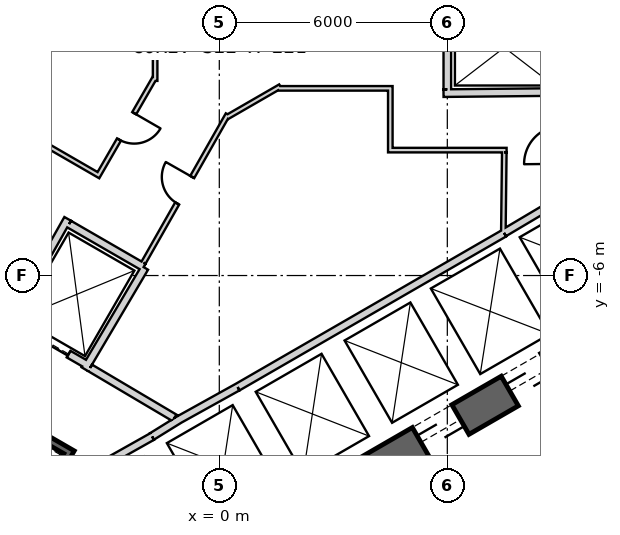
"""IFC4 building model, lengths in metres.
Left out: names, types, materials, properties, quantities, classifications, styles, units other than length and angle.
Written with IfcOpenShell. Run it as: python <this file> out.ifc"""

import sys

from ifc_helpers import new_model, si_unit, direction, frame, frame_2d, origin, place, context, subcontext, project, spatial, rectangle, extrude, element, fill, save


model = new_model("IFC4")
c1 = context("Model", 3, precision=1e-05, world=origin(), true_north=direction((0.0, 1.0)))
c2 = subcontext(c1, "Body", "Model", "MODEL_VIEW")
j1 = project(units=[si_unit("LENGTHUNIT", "METRE"), si_unit("PLANEANGLEUNIT", "RADIAN")], contexts=[c1])
p1 = place(None, origin())
s1 = spatial("IfcSite", under=j1, at=p1, CompositionType="ELEMENT")
p2 = place(p1, origin())
s2 = spatial("IfcBuilding", under=s1, at=p2, CompositionType="ELEMENT")
p3 = place(p2, frame((0.0, 0.0, 169.2)))
s3 = spatial("IfcBuildingStorey", under=s2, at=p3, CompositionType="ELEMENT", Elevation=169.2)
p4 = place(p3, frame((-7.825, -17.97, 0.0), z_axis=(0.0, 0.0, 1.0), x_axis=(0.866028369851, 0.499994862586, 0.0)))
e1 = element("IfcWall", 1, at=p4, inside=s3, PredefinedType="SHEAR", context=c2, shape_type="SweptSolid", body=[
    extrude(rectangle(XDim=31.523, YDim=0.9, at=frame_2d((15.762, 0.0))), origin(), (0.0, 0.0, 1.0), 4.0),
])
p5 = place(p4, frame((7.062, 0.0, 0.0)))
e2 = element("IfcOpeningElement", 2, at=p5, cuts=e1, PredefinedType="OPENING", context=c2, shape_type="SweptSolid", body=[
    extrude(rectangle(XDim=1.2, YDim=2.4, at=frame_2d((0.6, 1.2))), frame((0.0, 0.46, 0.0), z_axis=(0.0, -1.0, 0.0), x_axis=(1.0, 0.0, 0.0)), (0.0, 0.0, 1.0), 0.92),
])
p6 = place(p4, frame((9.762, 0.0, 0.0)))
e3 = element("IfcOpeningElement", 3, at=p6, cuts=e1, PredefinedType="OPENING", context=c2, shape_type="SweptSolid", body=[
    extrude(rectangle(XDim=1.2, YDim=2.4, at=frame_2d((0.6, 1.2))), frame((0.0, 0.46, 0.0), z_axis=(0.0, -1.0, 0.0), x_axis=(1.0, 0.0, 0.0)), (0.0, 0.0, 1.0), 0.92),
])
p7 = place(p4, frame((12.462, 0.0, 0.0)))
e4 = element("IfcOpeningElement", 4, at=p7, cuts=e1, PredefinedType="OPENING", context=c2, shape_type="SweptSolid", body=[
    extrude(rectangle(XDim=1.2, YDim=2.4, at=frame_2d((0.6, 1.2))), frame((0.0, 0.46, 0.0), z_axis=(0.0, -1.0, 0.0), x_axis=(1.0, 0.0, 0.0)), (0.0, 0.0, 1.0), 0.92),
])
p8 = place(p4, frame((15.162, 0.0, 0.0)))
e5 = element("IfcOpeningElement", 5, at=p8, cuts=e1, PredefinedType="OPENING", context=c2, shape_type="SweptSolid", body=[
    extrude(rectangle(XDim=1.2, YDim=2.4, at=frame_2d((0.6, 1.2))), frame((0.0, 0.46, 0.0), z_axis=(0.0, -1.0, 0.0), x_axis=(1.0, 0.0, 0.0)), (0.0, 0.0, 1.0), 0.92),
])
p9 = place(p4, frame((17.862, 0.0, 0.0)))
e6 = element("IfcOpeningElement", 6, at=p9, cuts=e1, PredefinedType="OPENING", context=c2, shape_type="SweptSolid", body=[
    extrude(rectangle(XDim=1.2, YDim=2.4, at=frame_2d((0.6, 1.2))), frame((0.0, 0.46, 0.0), z_axis=(0.0, -1.0, 0.0), x_axis=(1.0, 0.0, 0.0)), (0.0, 0.0, 1.0), 0.92),
])
p10 = place(p4, frame((20.562, 0.0, 0.0)))
e7 = element("IfcOpeningElement", 7, at=p10, cuts=e1, PredefinedType="OPENING", context=c2, shape_type="SweptSolid", body=[
    extrude(rectangle(XDim=1.2, YDim=2.4, at=frame_2d((0.6, 1.2))), frame((0.0, 0.46, 0.0), z_axis=(0.0, -1.0, 0.0), x_axis=(1.0, 0.0, 0.0)), (0.0, 0.0, 1.0), 0.92),
])
p11 = place(p4, frame((26.712, 0.0, 0.0)))
e8 = element("IfcOpeningElement", 8, at=p11, cuts=e1, PredefinedType="OPENING", context=c2, shape_type="SweptSolid", body=[
    extrude(rectangle(XDim=1.2, YDim=2.4, at=frame_2d((0.6, 1.2))), frame((0.0, 0.46, 0.0), z_axis=(0.0, -1.0, 0.0), x_axis=(1.0, 0.0, 0.0)), (0.0, 0.0, 1.0), 0.92),
])
p12 = place(p4, frame((3.612, 0.0, 0.0)))
e9 = element("IfcOpeningElement", 9, at=p12, cuts=e1, PredefinedType="OPENING", context=c2, shape_type="SweptSolid", body=[
    extrude(rectangle(XDim=1.2, YDim=2.4, at=frame_2d((0.6, 1.2))), frame((0.0, 0.46, 0.0), z_axis=(0.0, -1.0, 0.0), x_axis=(1.0, 0.0, 0.0)), (0.0, 0.0, 1.0), 0.92),
])
p13 = place(p3, frame((0.483, -8.936, 0.0), z_axis=(0.0, 0.0, 1.0), x_axis=(0.866030989016, 0.499990325971, 0.0)))
e10 = element("IfcWall", 10, at=p13, inside=s3, PredefinedType="PLUMBINGWALL", context=c2, shape_type="SweptSolid", body=[
    extrude(rectangle(XDim=8.1, YDim=0.2, at=frame_2d((4.05, 0.0))), origin(), (0.0, 0.0, 1.0), 3.7),
])
p14 = place(p3, frame((7.493, -4.878, 0.0), z_axis=(0.0, 0.0, 1.0), x_axis=(0.859981807212, 0.510324691999, 0.0)))
e11 = element("IfcWall", 11, at=p14, inside=s3, PredefinedType="PLUMBINGWALL", context=c2, shape_type="SweptSolid", body=[
    extrude(rectangle(XDim=1.845, YDim=0.2, at=frame_2d((0.922, 0.0))), origin(), (0.0, 0.0, 1.0), 3.7),
])
p15 = place(p3, frame((-1.769, -10.237, 0.0), z_axis=(0.0, 0.0, 1.0), x_axis=(-0.871534483978, -0.490334215854, 0.0)))
e12 = element("IfcWall", 12, at=p15, inside=s3, PredefinedType="PLUMBINGWALL", context=c2, shape_type="SweptSolid", body=[
    extrude(rectangle(XDim=2.7, YDim=0.2, at=frame_2d((1.35, 0.0))), origin(), (0.0, 0.0, 1.0), 3.7),
])
p16 = place(p3, frame((-1.024, -9.771, 0.0), z_axis=(0.0, 0.0, 1.0), x_axis=(-0.850348075135, -0.526220629693, 0.0)))
e13 = element("IfcWall", 13, at=p16, inside=s3, PredefinedType="PLUMBINGWALL", context=c2, shape_type="SweptSolid", body=[
    extrude(rectangle(XDim=0.878, YDim=0.2, at=frame_2d((0.439, 0.0))), origin(), (0.0, 0.0, 1.0), 3.7),
])
p17 = place(p3, frame((-1.13, -9.831, 0.0), z_axis=(0.0, 0.0, 1.0), x_axis=(0.874269620932, 0.485440655401, 0.0)))
e14 = element("IfcWall", 14, at=p17, inside=s3, PredefinedType="PLUMBINGWALL", context=c2, shape_type="SweptSolid", body=[
    extrude(rectangle(XDim=1.845, YDim=0.2, at=frame_2d((0.922, 0.0))), origin(), (0.0, 0.0, 1.0), 3.7),
])
p18 = place(p3, frame((5.9, -1.201, 0.0), z_axis=(0.0, 0.0, 1.0), x_axis=(0.999950064753, 0.009993397809, 0.0)))
e15 = element("IfcWall", 15, at=p18, inside=s3, PredefinedType="PLUMBINGWALL", context=c2, shape_type="SweptSolid", body=[
    extrude(rectangle(XDim=3.2, YDim=0.2, at=frame_2d((1.6, 0.0))), origin(), (0.0, 0.0, 1.0), 3.7),
])
p19 = place(p3, frame((6.0, -1.1, 0.0), z_axis=(0.0, 0.0, 1.0), x_axis=(0.0, 1.0, 0.0)))
e16 = element("IfcWall", 16, at=p19, inside=s3, PredefinedType="PLUMBINGWALL", context=c2, shape_type="SweptSolid", body=[
    extrude(rectangle(XDim=2.28, YDim=0.2, at=frame_2d((1.14, 0.0))), origin(), (0.0, 0.0, 1.0), 3.7),
])
p20 = place(p3, frame((-3.905, -10.563, -0.3), z_axis=(0.0, 0.0, 1.0), x_axis=(-0.500012932018, -0.866017937352, 0.0)))
e17 = element("IfcWall", 17, at=p20, inside=s3, PredefinedType="SHEAR", context=c2, shape_type="SweptSolid", body=[
    extrude(rectangle(XDim=8.1, YDim=0.2, at=frame_2d((4.05, 0.0))), origin(), (0.0, 0.0, 1.0), 4.0),
])
p21 = place(p3, frame((-4.041, -10.599, -0.3), z_axis=(0.0, 0.0, 1.0), x_axis=(-0.866047807691, 0.499961193289, 0.0)))
e18 = element("IfcWall", 18, at=p21, inside=s3, PredefinedType="SHEAR", context=c2, shape_type="SweptSolid", body=[
    extrude(rectangle(XDim=3.6, YDim=0.2, at=frame_2d((1.8, 0.0))), origin(), (0.0, 0.0, 1.0), 4.0),
])
p22 = place(p21, frame((1.25, 0.0, 0.3)))
e19 = element("IfcOpeningElement", 19, at=p22, cuts=e18, PredefinedType="OPENING", context=c2, shape_type="SweptSolid", body=[
    extrude(rectangle(XDim=1.1, YDim=2.1, at=frame_2d((0.55, 1.05))), frame((0.0, 0.11, 0.0), z_axis=(0.0, -1.0, 0.0), x_axis=(1.0, 0.0, 0.0)), (0.0, 0.0, 1.0), 0.22),
])
p23 = place(p3, frame((-3.446, -8.368, 0.0), z_axis=(0.0, 0.0, 1.0), x_axis=(-0.866024647952, 0.500001309137, 0.0)))
e20 = element("IfcWall", 20, at=p23, inside=s3, PredefinedType="PLUMBINGWALL", context=c2, shape_type="SweptSolid", body=[
    extrude(rectangle(XDim=2.4, YDim=0.2, at=frame_2d((1.2, 0.0))), origin(), (0.0, 0.0, 1.0), 3.7),
])
p24 = place(p23, frame((0.6, 0.0, 0.0)))
e21 = element("IfcOpeningElement", 21, at=p24, cuts=e20, PredefinedType="OPENING", context=c2, shape_type="SweptSolid", body=[
    extrude(rectangle(XDim=1.2, YDim=2.4, at=frame_2d((0.6, 1.2))), frame((0.0, 0.11, 0.0), z_axis=(0.0, -1.0, 0.0), x_axis=(1.0, 0.0, 0.0)), (0.0, 0.0, 1.0), 0.22),
])
p25 = place(p3, frame((-1.961, -5.796, 0.0), z_axis=(0.0, 0.0, 1.0), x_axis=(-0.508647062354, -0.860975125052, 0.0)))
e22 = element("IfcWall", 22, at=p25, inside=s3, PredefinedType="PLUMBINGWALL", context=c2, shape_type="SweptSolid", body=[
    extrude(rectangle(XDim=3.1, YDim=0.2, at=frame_2d((1.55, 0.0))), origin(), (0.0, 0.0, 1.0), 3.7),
])
p26 = place(p3, frame((-3.99, -4.509, 0.0), z_axis=(0.0, 0.0, 1.0), x_axis=(-0.491358283181, -0.870957540612, 0.0)))
e23 = element("IfcWall", 23, at=p26, inside=s3, PredefinedType="PLUMBINGWALL", context=c2, shape_type="SweptSolid", body=[
    extrude(rectangle(XDim=3.2, YDim=0.2, at=frame_2d((1.6, 0.0))), origin(), (0.0, 0.0, 1.0), 3.7),
])
p27 = place(p3, frame((-3.953, -4.646, 0.0), z_axis=(0.0, 0.0, 1.0), x_axis=(0.866065302921, -0.4999308863, 0.0)))
e24 = element("IfcWall", 24, at=p27, inside=s3, PredefinedType="PLUMBINGWALL", context=c2, shape_type="SweptSolid", body=[
    extrude(rectangle(XDim=2.264, YDim=0.2, at=frame_2d((1.132, 0.0))), origin(), (0.0, 0.0, 1.0), 3.7),
])
p28 = place(p3, frame((-3.401, -8.43, 0.0), z_axis=(0.0, 0.0, 1.0), x_axis=(0.860615607571, -0.509255118781, 0.0)))
e25 = element("IfcWall", 25, at=p28, inside=s3, PredefinedType="PARTITIONING", context=c2, shape_type="SweptSolid", body=[
    extrude(rectangle(XDim=2.581, YDim=0.2, at=frame_2d((1.29, 0.0))), origin(), (0.0, 0.0, 1.0), 3.7),
])
p29 = place(p3, frame((0.224, -1.761, 0.0), z_axis=(0.0, 0.0, 1.0), x_axis=(-0.494327216836, -0.869275907118, 0.0)))
e26 = element("IfcWall", 26, at=p29, inside=s3, PredefinedType="PARTITIONING", context=c2, shape_type="SweptSolid", body=[
    extrude(rectangle(XDim=4.487, YDim=0.12, at=frame_2d((2.244, 0.0))), origin(), (0.0, 0.0, 1.0), 3.7),
])
p30 = place(p29, frame((1.895, 0.0, 0.0)))
e27 = element("IfcOpeningElement", 27, at=p30, cuts=e26, PredefinedType="OPENING", context=c2, shape_type="SweptSolid", body=[
    extrude(rectangle(XDim=0.8, YDim=2.1, at=frame_2d((0.4, 1.05))), frame((0.0, 0.07, 0.0), z_axis=(0.0, -1.0, 0.0), x_axis=(1.0, 0.0, 0.0)), (0.0, 0.0, 1.0), 0.14),
])
p31 = place(p3, frame((1.605, -1.023, 0.0), z_axis=(0.0, 0.0, 1.0), x_axis=(-0.866001581989, -0.50004125829, 0.0)))
e28 = element("IfcWall", 28, at=p31, inside=s3, PredefinedType="PARTITIONING", context=c2, shape_type="SweptSolid", body=[
    extrude(rectangle(XDim=1.635, YDim=0.12, at=frame_2d((0.817, 0.0))), origin(), (0.0, 0.0, 1.0), 3.7),
])
p32 = place(p3, frame((4.56, -1.075, 0.0), z_axis=(0.0, 0.0, 1.0), x_axis=(-1.0, 0.0, 0.0)))
e29 = element("IfcWall", 29, at=p32, inside=s3, PredefinedType="PARTITIONING", context=c2, shape_type="SweptSolid", body=[
    extrude(rectangle(XDim=3.026, YDim=0.12, at=frame_2d((1.513, 0.0))), origin(), (0.0, 0.0, 1.0), 3.7),
])
p33 = place(p3, frame((4.5, -2.76, 0.0), z_axis=(0.0, 0.0, 1.0), x_axis=(0.0, 1.0, 0.0)))
e30 = element("IfcWall", 30, at=p33, inside=s3, PredefinedType="PARTITIONING", context=c2, shape_type="SweptSolid", body=[
    extrude(rectangle(XDim=1.625, YDim=0.12, at=frame_2d((0.812, 0.0))), origin(), (0.0, 0.0, 1.0), 3.7),
])
p34 = place(p3, frame((7.56, -2.7, 0.0), z_axis=(0.0, 0.0, 1.0), x_axis=(-1.0, 0.0, 0.0)))
e31 = element("IfcWall", 31, at=p34, inside=s3, PredefinedType="PARTITIONING", context=c2, shape_type="SweptSolid", body=[
    extrude(rectangle(XDim=3.0, YDim=0.12, at=frame_2d((1.5, 0.0))), origin(), (0.0, 0.0, 1.0), 3.7),
])
p35 = place(p3, frame((7.475, -4.865, 0.0), z_axis=(0.0, 0.0, 1.0), x_axis=(0.011716133148, 0.999931363757, 0.0)))
e32 = element("IfcWall", 32, at=p35, inside=s3, PredefinedType="PARTITIONING", context=c2, shape_type="SweptSolid", body=[
    extrude(rectangle(XDim=2.105, YDim=0.12, at=frame_2d((1.052, 0.0))), origin(), (0.0, 0.0, 1.0), 3.7),
])
p36 = place(p3, frame((-1.689, -0.879, 0.0), z_axis=(0.0, 0.0, 1.0), x_axis=(0.0, 1.0, 0.0)))
e33 = element("IfcWall", 33, at=p36, inside=s3, PredefinedType="PARTITIONING", context=c2, shape_type="SweptSolid", body=[
    extrude(rectangle(XDim=1.635, YDim=0.12, at=frame_2d((0.818, 0.0))), origin(), (0.0, 0.0, 1.0), 3.7),
])
p37 = place(p3, frame((-3.211, -3.412, 0.0), z_axis=(0.0, 0.0, 1.0), x_axis=(0.499983190554, 0.866035108505, 0.0)))
e34 = element("IfcWall", 34, at=p37, inside=s3, PredefinedType="PARTITIONING", context=c2, shape_type="SweptSolid", body=[
    extrude(rectangle(XDim=3.026, YDim=0.12, at=frame_2d((1.513, 0.0))), origin(), (0.0, 0.0, 1.0), 3.7),
])
p38 = place(p37, frame((1.143, 0.0, 0.0)))
e35 = element("IfcOpeningElement", 35, at=p38, cuts=e34, PredefinedType="OPENING", context=c2, shape_type="SweptSolid", body=[
    extrude(rectangle(XDim=0.8, YDim=2.1, at=frame_2d((0.4, 1.05))), frame((0.0, 0.07, 0.0), z_axis=(0.0, -1.0, 0.0), x_axis=(1.0, 0.0, 0.0)), (0.0, 0.0, 1.0), 0.14),
])
p39 = place(p3, frame((-4.64, -2.517, 0.0), z_axis=(0.0, 0.0, 1.0), x_axis=(0.866015446554, -0.500017246033, 0.0)))
e36 = element("IfcWall", 36, at=p39, inside=s3, PredefinedType="PARTITIONING", context=c2, shape_type="SweptSolid", body=[
    extrude(rectangle(XDim=1.625, YDim=0.12, at=frame_2d((0.812, 0.0))), origin(), (0.0, 0.0, 1.0), 3.7),
])
p40 = place(p3, frame((6.275, -14.968, 0.0), z_axis=(0.0, 0.0, 1.0), x_axis=(0.866028424491, 0.499994767946, 0.0)))
e37 = element("IfcWall", 37, at=p40, inside=s3, PredefinedType="PARTITIONING", context=c2, shape_type="SweptSolid", body=[
    extrude(rectangle(XDim=18.496, YDim=0.2, at=frame_2d((9.248, 0.0))), origin(), (0.0, 0.0, 1.0), 2.88),
])
p41 = place(p24, origin())
e38 = element("IfcDoor", 38, at=p41, inside=s3, OperationType="SLIDING_TO_LEFT", PredefinedType="USERDEFINED", context=c2, shape_type="SweptSolid", body=[
    extrude(rectangle(XDim=1.2, YDim=2.4, at=frame_2d((0.6, 1.2))), frame((0.0, 0.025, 0.0), z_axis=(0.0, -1.0, 0.0), x_axis=(1.0, 0.0, 0.0)), (0.0, 0.0, 1.0), 0.05),
])
fill(e21, e38)
p42 = place(p30, origin())
e39 = element("IfcDoor", 39, at=p42, inside=s3, OperationType="SINGLE_SWING_LEFT", PredefinedType="USERDEFINED", context=c2, shape_type="SweptSolid", body=[
    extrude(rectangle(XDim=0.8, YDim=2.1, at=frame_2d((0.4, 1.05))), frame((0.0, 0.025, 0.0), z_axis=(0.0, -1.0, 0.0), x_axis=(1.0, 0.0, 0.0)), (0.0, 0.0, 1.0), 0.05),
])
fill(e27, e39)
p43 = place(p38, origin())
e40 = element("IfcDoor", 40, at=p43, inside=s3, OperationType="SINGLE_SWING_LEFT", PredefinedType="USERDEFINED", context=c2, shape_type="SweptSolid", body=[
    extrude(rectangle(XDim=0.8, YDim=2.1, at=frame_2d((0.4, 1.05))), frame((0.0, 0.025, 0.0), z_axis=(0.0, -1.0, 0.0), x_axis=(1.0, 0.0, 0.0)), (0.0, 0.0, 1.0), 0.05),
])
fill(e35, e40)
p44 = place(p8, origin())
e41 = element("IfcDoor", 41, at=p44, inside=s3, OperationType="SLIDING_TO_LEFT", PredefinedType="USERDEFINED", context=c2, shape_type="SweptSolid", body=[
    extrude(rectangle(XDim=1.2, YDim=2.4, at=frame_2d((0.6, 1.2))), frame((0.0, 0.025, 0.0), z_axis=(0.0, -1.0, 0.0), x_axis=(1.0, 0.0, 0.0)), (0.0, 0.0, 1.0), 0.05),
])
fill(e5, e41)
p45 = place(p9, origin())
e42 = element("IfcDoor", 42, at=p45, inside=s3, OperationType="SLIDING_TO_LEFT", PredefinedType="USERDEFINED", context=c2, shape_type="SweptSolid", body=[
    extrude(rectangle(XDim=1.2, YDim=2.4, at=frame_2d((0.6, 1.2))), frame((0.0, 0.025, 0.0), z_axis=(0.0, -1.0, 0.0), x_axis=(1.0, 0.0, 0.0)), (0.0, 0.0, 1.0), 0.05),
])
fill(e6, e42)
save(model, sys.argv[1])
